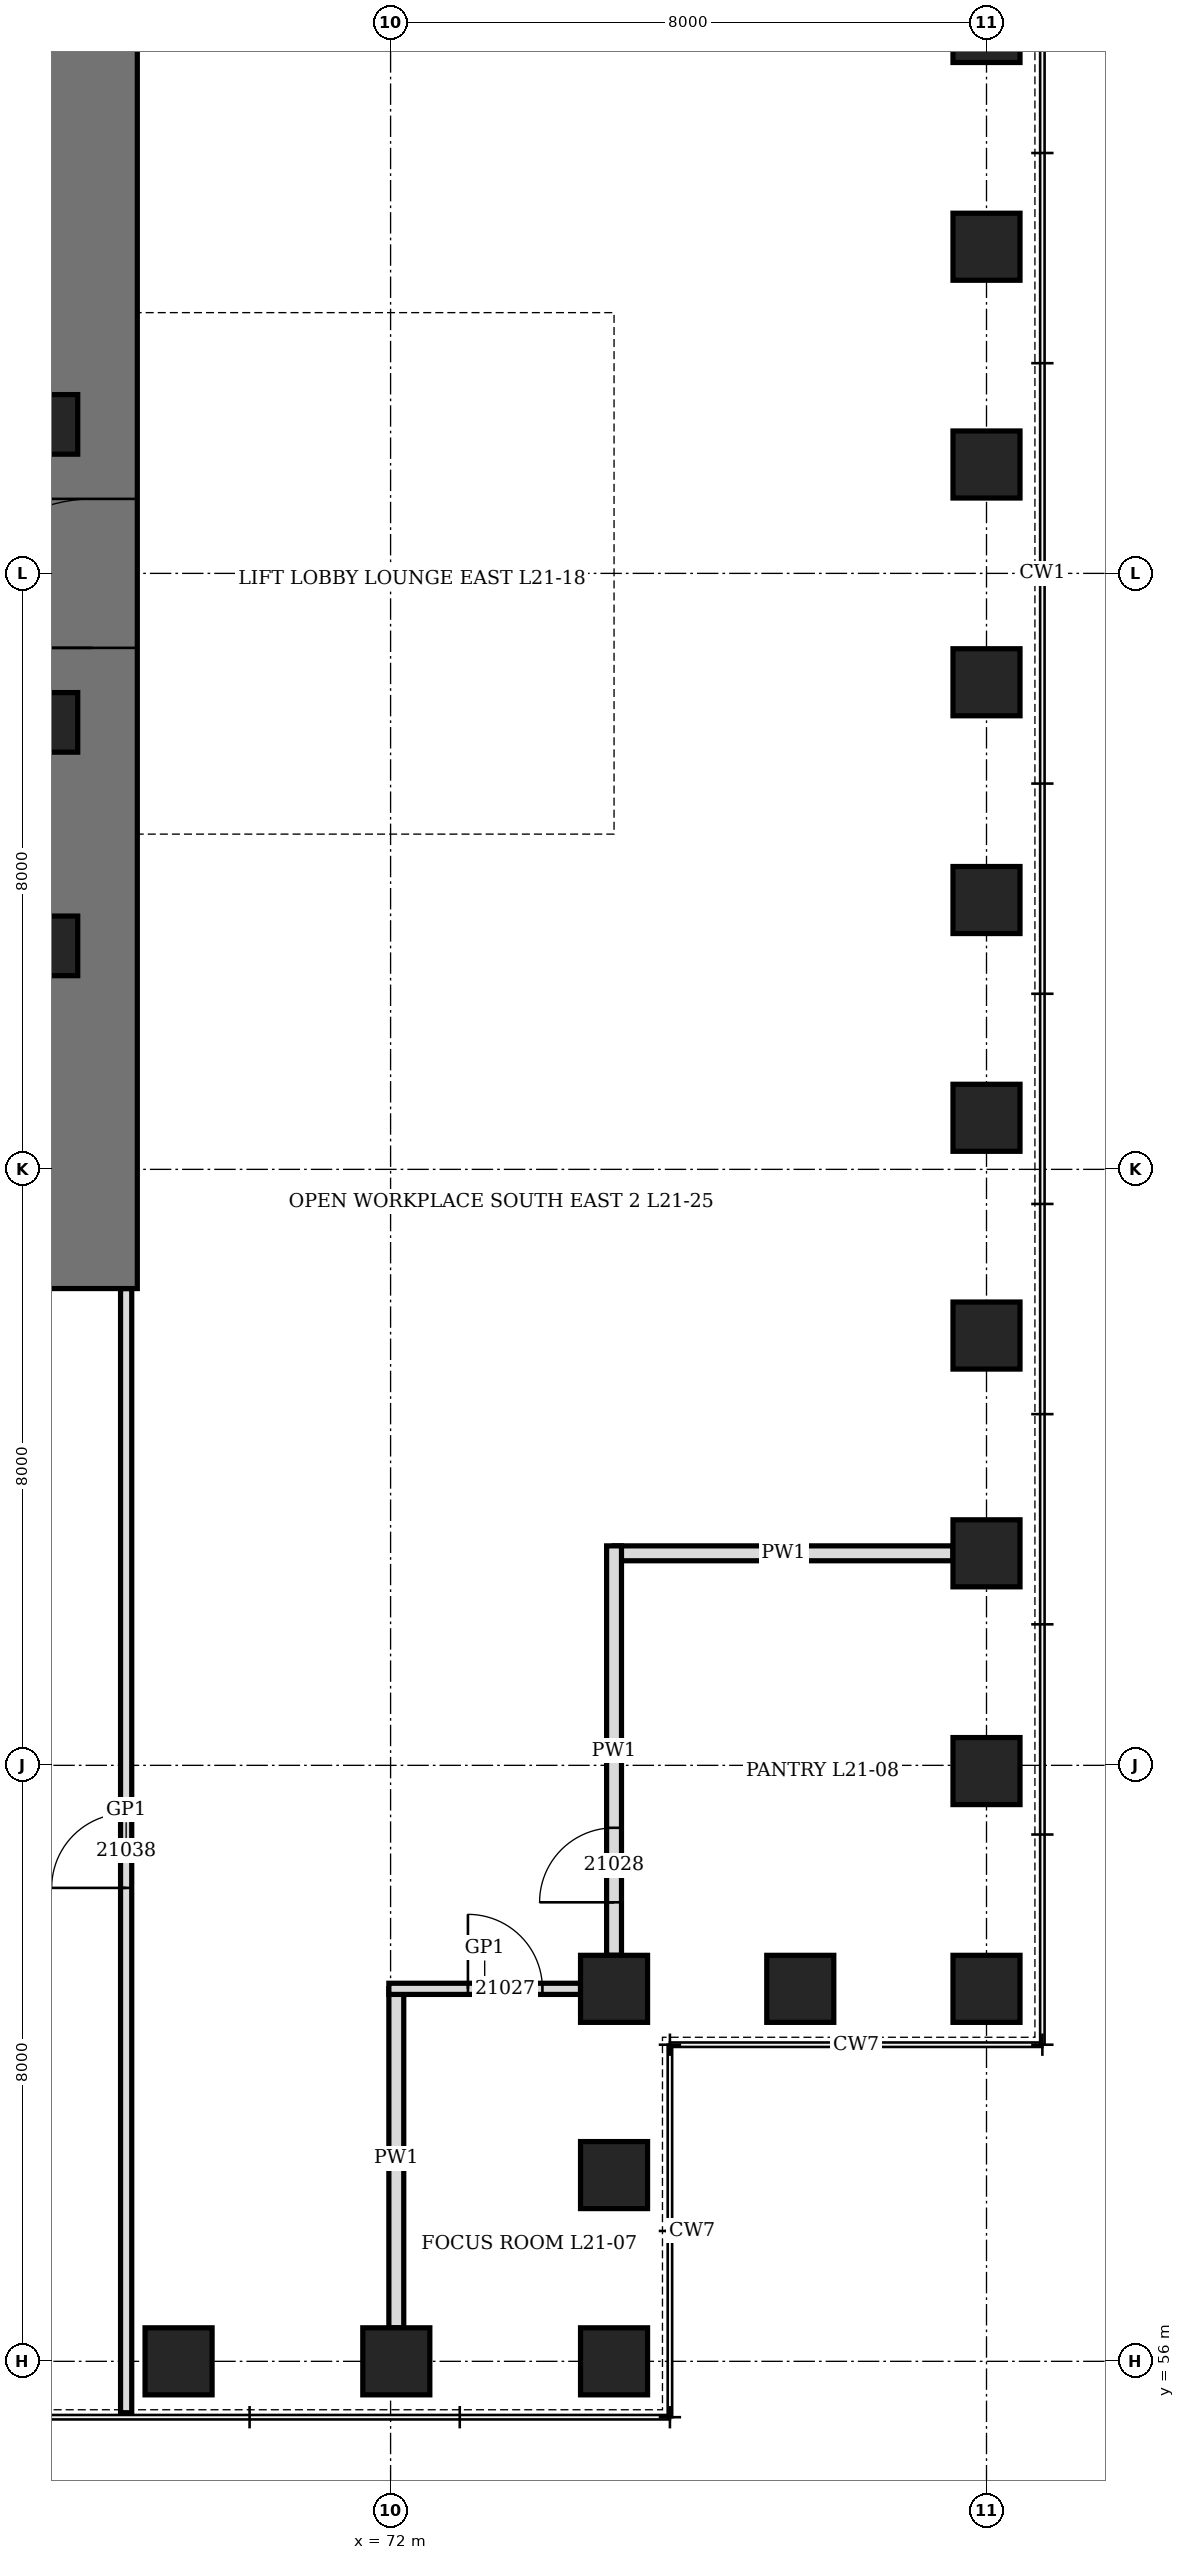
"""IFC4 building model, lengths in metres.
Left out: names, types, materials, properties, quantities, classifications, styles, units other than length and angle.
Written with IfcOpenShell. Run it as: python <this file> out.ifc"""

import sys

from ifc_helpers import new_model, si_unit, direction, frame, frame_2d, origin, origin_2d, place, context, subcontext, project, spatial, rectangle, hollow_rectangle, extrude, element, fill, save


model = new_model("IFC4")
c1 = context("Model", 3, precision=1e-05, world=origin(), true_north=direction((0.0, 1.0)))
c2 = subcontext(c1, "Body", "Model", "MODEL_VIEW")
j1 = project(units=[si_unit("LENGTHUNIT", "METRE"), si_unit("PLANEANGLEUNIT", "RADIAN")], contexts=[c1])
p1 = place(None, origin())
s1 = spatial("IfcSite", under=j1, at=p1, CompositionType="ELEMENT")
p2 = place(p1, origin())
s2 = spatial("IfcBuilding", under=s1, at=p2, CompositionType="ELEMENT")
p3 = place(p2, frame((0.0, 0.0, 97.9)))
s3 = spatial("IfcBuildingStorey", under=s2, at=p3, CompositionType="ELEMENT", Elevation=97.9)
for number, where, z_axis, x_axis in (
    (1, (69.154, 56.0, 0.0), (0.0, 0.0, 1.0), (1.0, 0.0, 0.0)),
    (2, (72.077, 56.0, 0.0), (0.0, 0.0, 1.0), (1.0, 0.0, 0.0)),
    (3, (75.0, 56.0, 0.0), (0.0, 0.0, 1.0), (0.0, 1.0, 0.0)),
    (4, (75.0, 58.5, 0.0), (0.0, 0.0, 1.0), (0.0, 1.0, 0.0)),
    (5, (75.0, 61.0, 0.0), (0.0, 0.0, 1.0), (1.0, 0.0, 0.0)),
    (6, (77.5, 61.0, 0.0), (0.0, 0.0, 1.0), (1.0, 0.0, 0.0)),
    (7, (80.0, 61.0, 0.0), (0.0, 0.0, 1.0), (0.0, 1.0, 0.0)),
    (8, (80.0, 63.923, 0.0), (0.0, 0.0, 1.0), (0.0, 1.0, 0.0)),
    (9, (80.0, 66.846, 0.0), (0.0, 0.0, 1.0), (0.0, 1.0, 0.0)),
    (10, (80.0, 69.769, 0.0), (0.0, 0.0, 1.0), (0.0, 1.0, 0.0)),
    (11, (80.0, 72.692, 0.0), (0.0, 0.0, 1.0), (0.0, 1.0, 0.0)),
    (12, (80.0, 75.615, 0.0), (0.0, 0.0, 1.0), (0.0, 1.0, 0.0)),
    (13, (80.0, 78.539, 0.0), (0.0, 0.0, 1.0), (0.0, 1.0, 0.0)),
    (14, (80.0, 81.461, 0.0), (0.0, 0.0, 1.0), (0.0, 1.0, 0.0)),
    (15, (80.0, 84.385, 0.0), (0.0, 0.0, 1.0), (0.0, 1.0, 0.0)),
    (16, (80.0, 87.308, 0.0), (0.0, 0.0, 1.0), (0.0, 1.0, 0.0)),
):
    element("IfcColumn", number, at=place(p3, frame(where, z_axis=z_axis, x_axis=x_axis)), inside=s3, PredefinedType="COLUMN", context=c2, shape_type="SweptSolid", body=[
        extrude(hollow_rectangle(XDim=0.9, YDim=0.9, WallThickness=0.12, at=origin_2d()), origin(), (0.0, 0.0, 1.0), 4.2),
    ])
p4 = place(p3, frame((68.0, 70.4, 0.0), z_axis=(0.0, 0.0, 1.0), x_axis=(0.0, 1.0, 0.0)))
e17 = element("IfcWall", 17, at=p4, inside=s3, PredefinedType="SHEAR", context=c2, shape_type="SweptSolid", body=[
    extrude(rectangle(XDim=19.2, YDim=1.2, at=frame_2d((9.6, 0.0))), origin(), (0.0, 0.0, 1.0), 4.2),
])
p5 = place(p4, frame((8.6, 0.0, 0.0)))
e18 = element("IfcOpeningElement", 18, at=p5, cuts=e17, PredefinedType="OPENING", context=c2, shape_type="SweptSolid", body=[
    extrude(rectangle(XDim=2.0, YDim=2.4, at=frame_2d((1.0, 1.2))), frame((0.0, 0.61, 0.0), z_axis=(0.0, -1.0, 0.0), x_axis=(1.0, 0.0, 0.0)), (0.0, 0.0, 1.0), 1.22),
])
for number, where, z_axis, x_axis in (
    (19, (67.4, 75.0, 0.0), (0.0, 0.0, 1.0), (1.0, 0.0, 0.0)),
    (20, (67.4, 78.0, 0.0), (0.0, 0.0, 1.0), (1.0, 0.0, 0.0)),
    (21, (67.4, 82.0, 0.0), (0.0, 0.0, 1.0), (1.0, 0.0, 0.0)),
):
    element("IfcColumn", number, at=place(p3, frame(where, z_axis=z_axis, x_axis=x_axis)), inside=s3, PredefinedType="COLUMN", context=c2, shape_type="SweptSolid", body=[
        extrude(hollow_rectangle(XDim=0.8, YDim=0.8, WallThickness=0.1, at=origin_2d()), origin(), (0.0, 0.0, 1.0), 4.2),
    ])
for number, where, z_axis, x_axis in (
    (22, (72.077, 56.45, 0.0), (0.0, 0.0, 1.0), (0.0, 1.0, 0.0)),
    (23, (75.0, 66.846, 0.0), (0.0, 0.0, 1.0), (1.0, 0.0, 0.0)),
):
    element("IfcWall", number, at=place(p3, frame(where, z_axis=z_axis, x_axis=x_axis)), inside=s3, PredefinedType="PARTITIONING", context=c2, shape_type="SweptSolid", body=[
        extrude(rectangle(XDim=4.55, YDim=0.2, at=frame_2d((2.275, 0.0))), origin(), (0.0, 0.0, 1.0), 3.188),
    ])
p6 = place(p3, frame((71.977, 61.0, 0.0), z_axis=(0.0, 0.0, 1.0), x_axis=(1.0, 0.0, 0.0)))
e24 = element("IfcWall", 24, at=p6, inside=s3, PredefinedType="PARTITIONING", context=c2, shape_type="SweptSolid", body=[
    extrude(rectangle(XDim=2.573, YDim=0.15, at=frame_2d((1.287, 0.0))), origin(), (0.0, 0.0, 1.0), 3.95),
])
p7 = place(p6, frame((1.062, 0.0, 0.0)))
e25 = element("IfcOpeningElement", 25, at=p7, cuts=e24, PredefinedType="OPENING", context=c2, shape_type="SweptSolid", body=[
    extrude(rectangle(XDim=1.0, YDim=2.4, at=frame_2d((0.5, 1.2))), frame((0.0, 0.085, 0.0), z_axis=(0.0, -1.0, 0.0), x_axis=(1.0, 0.0, 0.0)), (0.0, 0.0, 1.0), 0.17),
])
p8 = place(p3, frame((68.45, 55.31, 0.0), z_axis=(0.0, 0.0, 1.0), x_axis=(0.0, 1.0, 0.0)))
e26 = element("IfcWall", 26, at=p8, inside=s3, PredefinedType="PARTITIONING", context=c2, shape_type="SweptSolid", body=[
    extrude(rectangle(XDim=15.09, YDim=0.15, at=frame_2d((7.545, 0.0))), origin(), (0.0, 0.0, 1.0), 3.95),
])
p9 = place(p8, frame((7.045, 0.0, 0.0)))
e27 = element("IfcOpeningElement", 27, at=p9, cuts=e26, PredefinedType="OPENING", context=c2, shape_type="SweptSolid", body=[
    extrude(rectangle(XDim=1.0, YDim=2.4, at=frame_2d((0.5, 1.2))), frame((0.0, 0.085, 0.0), z_axis=(0.0, -1.0, 0.0), x_axis=(1.0, 0.0, 0.0)), (0.0, 0.0, 1.0), 0.17),
])
p10 = place(p3, frame((75.0, 61.45, 0.0), z_axis=(0.0, 0.0, 1.0), x_axis=(0.0, 1.0, 0.0)))
e28 = element("IfcWall", 28, at=p10, inside=s3, PredefinedType="PARTITIONING", context=c2, shape_type="SweptSolid", body=[
    extrude(rectangle(XDim=5.496, YDim=0.2, at=frame_2d((2.748, 0.0))), origin(), (0.0, 0.0, 1.0), 3.95),
])
p11 = place(p10, frame((0.711, 0.0, 0.0)))
e29 = element("IfcOpeningElement", 29, at=p11, cuts=e28, PredefinedType="OPENING", context=c2, shape_type="SweptSolid", body=[
    extrude(rectangle(XDim=1.0, YDim=2.1, at=frame_2d((0.5, 1.05))), frame((0.0, 0.11, 0.0), z_axis=(0.0, -1.0, 0.0), x_axis=(1.0, 0.0, 0.0)), (0.0, 0.0, 1.0), 0.22),
])
p12 = place(p5, origin())
e30 = element("IfcDoor", 30, at=p12, inside=s3, OperationType="DOUBLE_DOOR_SINGLE_SWING", PredefinedType="DOOR", context=c2, shape_type="SweptSolid", body=[
    extrude(rectangle(XDim=2.0, YDim=2.4, at=frame_2d((1.0, 1.2))), frame((0.0, 0.35, 0.0), z_axis=(0.0, -1.0, 0.0), x_axis=(1.0, 0.0, 0.0)), (0.0, 0.0, 1.0), 0.7),
])
fill(e18, e30)
p13 = place(p7, origin())
e31 = element("IfcDoor", 31, at=p13, inside=s3, OperationType="SINGLE_SWING_RIGHT", PredefinedType="DOOR", context=c2, shape_type="SweptSolid", body=[
    extrude(rectangle(XDim=1.0, YDim=2.4, at=frame_2d((0.5, 1.2))), frame((0.0, 0.075, 0.0), z_axis=(0.0, -1.0, 0.0), x_axis=(1.0, 0.0, 0.0)), (0.0, 0.0, 1.0), 0.149),
])
fill(e25, e31)
p14 = place(p11, origin())
e32 = element("IfcDoor", 32, at=p14, inside=s3, OperationType="SINGLE_SWING_LEFT", PredefinedType="DOOR", context=c2, shape_type="SweptSolid", body=[
    extrude(rectangle(XDim=1.0, YDim=2.1, at=frame_2d((0.5, 1.05))), frame((0.0, 0.1, 0.0), z_axis=(0.0, -1.0, 0.0), x_axis=(1.0, 0.0, 0.0)), (0.0, 0.0, 1.0), 0.199),
])
fill(e29, e32)
p15 = place(p9, origin())
e33 = element("IfcDoor", 33, at=p15, inside=s3, OperationType="SINGLE_SWING_RIGHT", PredefinedType="DOOR", context=c2, shape_type="SweptSolid", body=[
    extrude(rectangle(XDim=1.0, YDim=2.4, at=frame_2d((0.5, 1.2))), frame((0.0, 0.075, 0.0), z_axis=(0.0, -1.0, 0.0), x_axis=(1.0, 0.0, 0.0)), (0.0, 0.0, 1.0), 0.149),
])
fill(e27, e33)
save(model, sys.argv[1])
